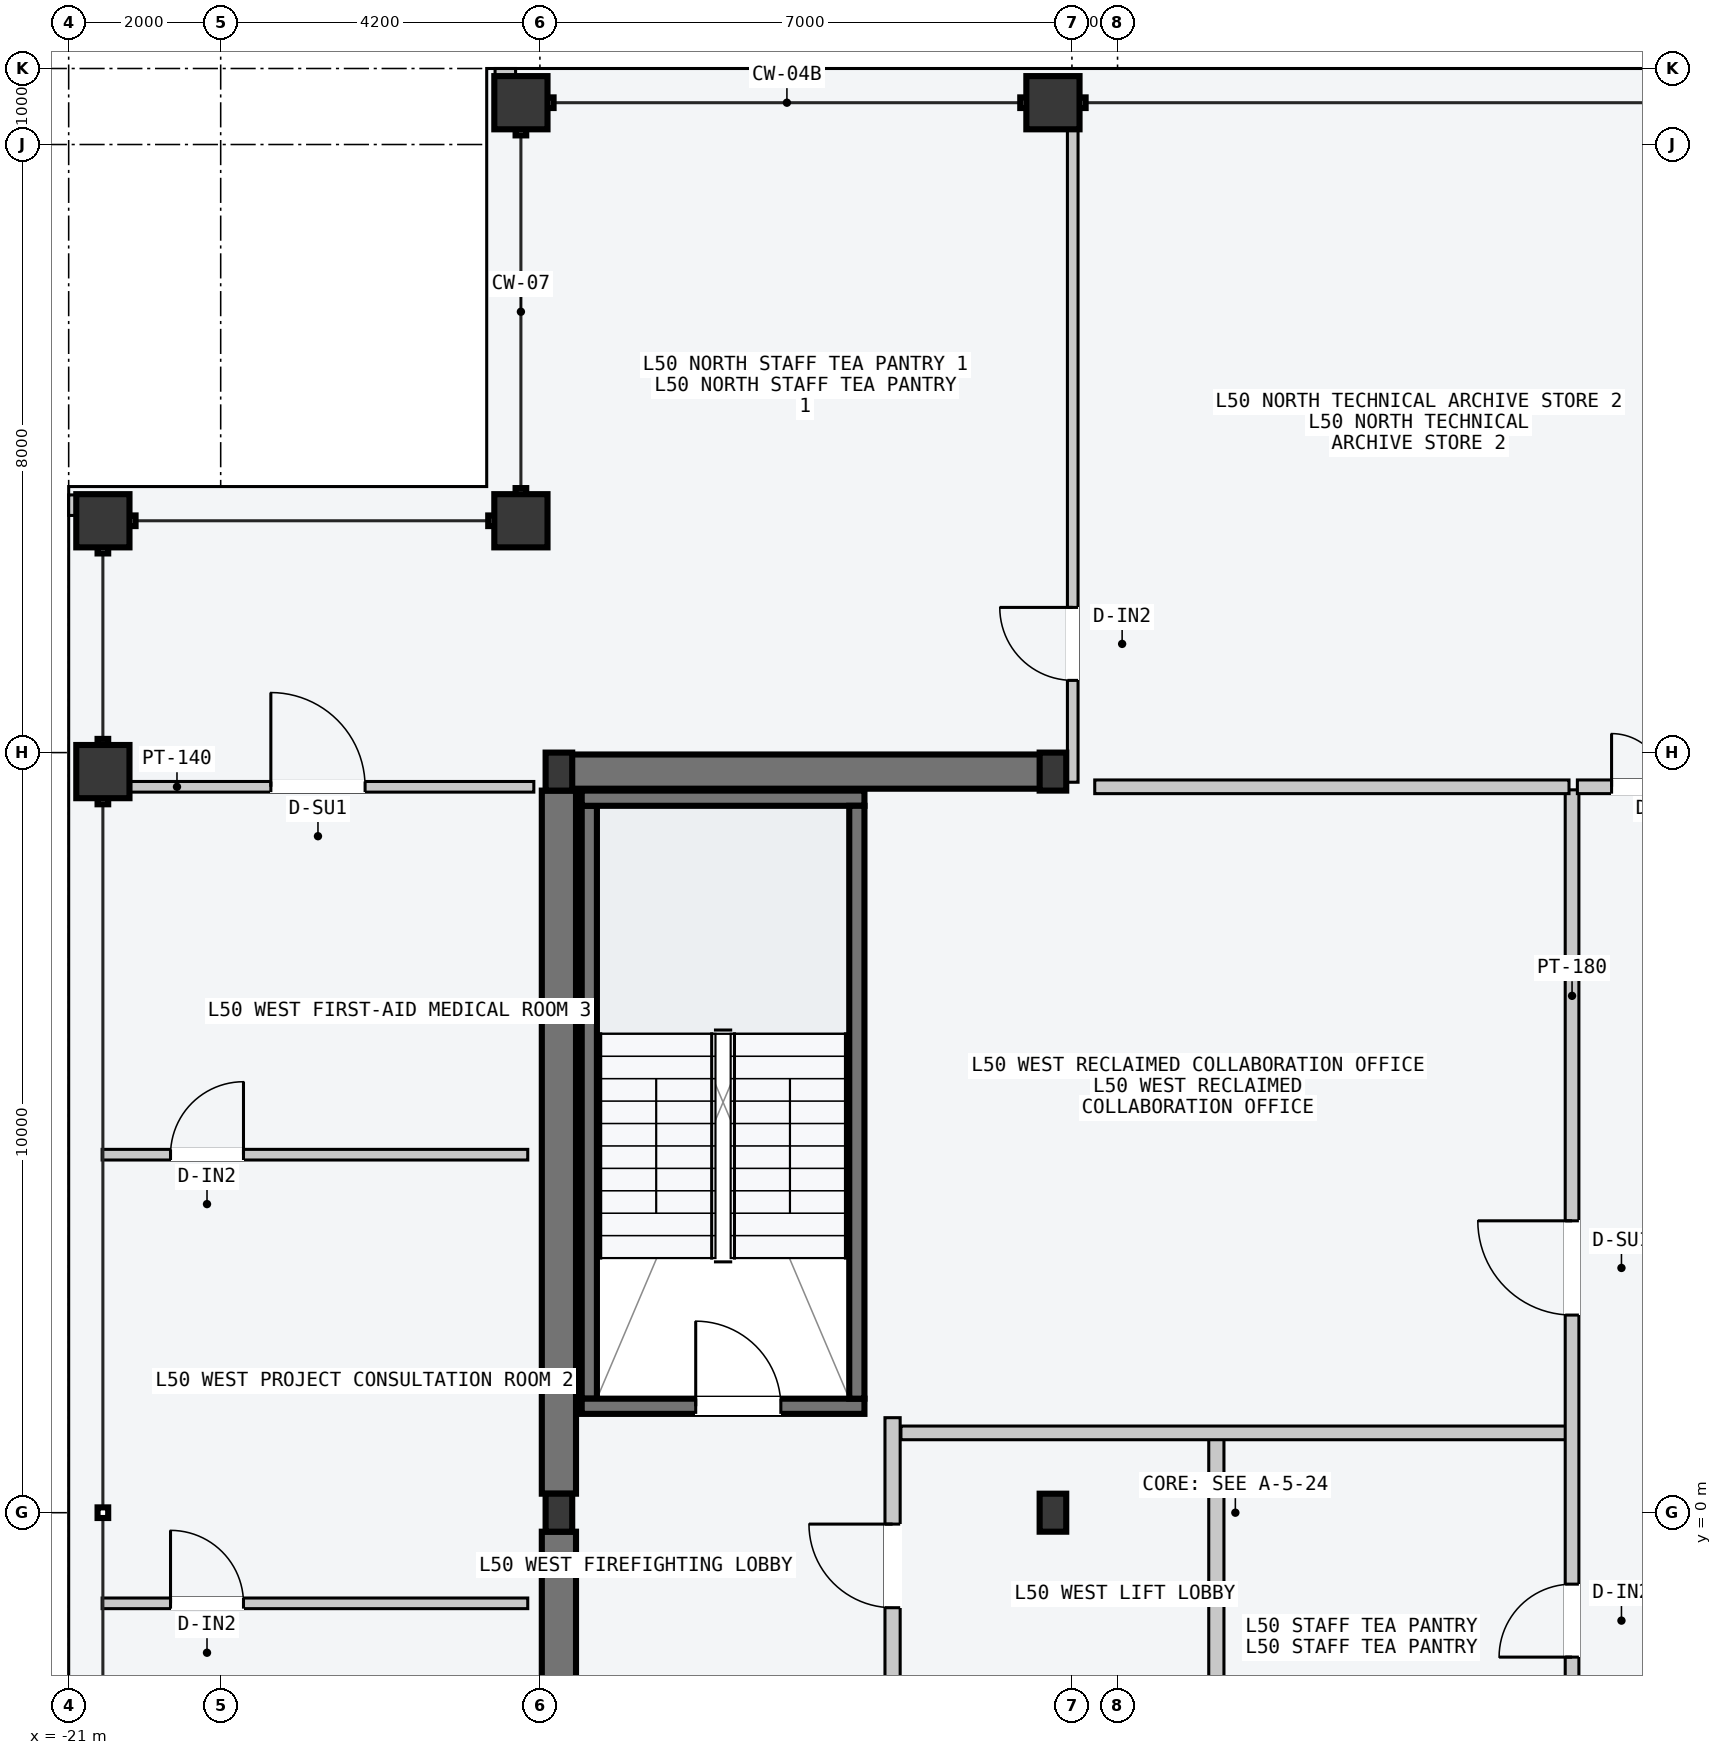
"""IFC4 building model, lengths in metres.
Left out: names, types, materials, properties, quantities, classifications, styles, units other than length and angle.
Written with IfcOpenShell. Run it as: python <this file> out.ifc"""

import sys

from ifc_helpers import new_model, si_unit, direction, frame, frame_2d, origin, origin_2d, place, context, subcontext, project, spatial, rectangle, hollow_rectangle, i_section, extrude, element, fill, save


model = new_model("IFC4")
c1 = context("Model", 3, precision=1e-05, world=origin(), true_north=direction((0.0, 1.0)))
c2 = subcontext(c1, "Body", "Model", "MODEL_VIEW")
j1 = project(units=[si_unit("LENGTHUNIT", "METRE"), si_unit("PLANEANGLEUNIT", "RADIAN")], contexts=[c1])
p1 = place(None, origin())
s1 = spatial("IfcSite", under=j1, at=p1, CompositionType="ELEMENT")
p2 = place(p1, origin())
s2 = spatial("IfcBuilding", under=s1, at=p2, CompositionType="ELEMENT")
p3 = place(p2, frame((0.0, 0.0, 191.1)))
s3 = spatial("IfcBuildingStorey", under=s2, at=p3, CompositionType="ELEMENT", Elevation=191.1)
p4 = place(p3, frame((-14.53, 9.75, -0.2), z_axis=(0.0, 0.0, 1.0), x_axis=(1.0, 0.0, 0.0)))
e1 = element("IfcWall", 1, at=p4, inside=s3, PredefinedType="SHEAR", context=c2, shape_type="SweptSolid", body=[
    extrude(rectangle(XDim=6.46, YDim=0.45, at=frame_2d((3.23, 0.0))), origin(), (0.0, 0.0, 1.0), 3.6),
])
for number, where, z_axis, x_axis in (
    (2, (-14.55, -9.5, -0.2), (0.0, 0.0, 1.0), (0.0, 1.0, 0.0)),
    (3, (-14.55, 0.25, -0.2), (0.0, 0.0, 1.0), (0.0, 1.0, 0.0)),
):
    element("IfcWall", number, at=place(p3, frame(where, z_axis=z_axis, x_axis=x_axis)), inside=s3, PredefinedType="SHEAR", context=c2, shape_type="SweptSolid", body=[
        extrude(rectangle(XDim=9.25, YDim=0.45, at=frame_2d((4.625, 0.0))), origin(), (0.0, 0.0, 1.0), 3.6),
    ])
p5 = place(p3, frame((-14.15, 1.5, -0.2), z_axis=(0.0, 0.0, 1.0), x_axis=(0.0, 1.0, 0.0)))
e4 = element("IfcWall", 4, at=p5, inside=s3, PredefinedType="SOLIDWALL", context=c2, shape_type="SweptSolid", body=[
    extrude(rectangle(XDim=7.8, YDim=0.2, at=frame_2d((3.9, 0.0))), origin(), (0.0, 0.0, 1.0), 3.6),
])
p6 = place(p3, frame((-14.25, 1.4, -0.2), z_axis=(0.0, 0.0, 1.0), x_axis=(1.0, 0.0, 0.0)))
e5 = element("IfcWall", 5, at=p6, inside=s3, PredefinedType="SOLIDWALL", context=c2, shape_type="SweptSolid", body=[
    extrude(rectangle(XDim=3.72, YDim=0.2, at=frame_2d((1.86, 0.0))), origin(), (0.0, 0.0, 1.0), 3.6),
])
p7 = place(p6, frame((1.5, 0.0, 0.2)))
e6 = element("IfcOpeningElement", 6, at=p7, cuts=e5, PredefinedType="OPENING", context=c2, shape_type="SweptSolid", body=[
    extrude(rectangle(XDim=1.12, YDim=2.18, at=frame_2d((0.56, 1.09))), frame((0.0, 0.11, 0.0), z_axis=(0.0, -1.0, 0.0), x_axis=(1.0, 0.0, 0.0)), (0.0, 0.0, 1.0), 0.22),
])
p8 = place(p3, frame((-14.25, 9.4, -0.2), z_axis=(0.0, 0.0, 1.0), x_axis=(1.0, 0.0, 0.0)))
e7 = element("IfcWall", 7, at=p8, inside=s3, PredefinedType="SOLIDWALL", context=c2, shape_type="SweptSolid", body=[
    extrude(rectangle(XDim=3.72, YDim=0.2, at=frame_2d((1.86, 0.0))), origin(), (0.0, 0.0, 1.0), 3.6),
])
p9 = place(p3, frame((-10.63, 1.5, -0.2), z_axis=(0.0, 0.0, 1.0), x_axis=(0.0, 1.0, 0.0)))
e8 = element("IfcWall", 8, at=p9, inside=s3, PredefinedType="SOLIDWALL", context=c2, shape_type="SweptSolid", body=[
    extrude(rectangle(XDim=7.8, YDim=0.2, at=frame_2d((3.9, 0.0))), origin(), (0.0, 0.0, 1.0), 3.6),
])
for number, where, z_axis, x_axis in (
    (9, (-14.55, 0.0, 0.0), (0.0, 0.0, 1.0), (1.0, 0.0, 0.0)),
    (10, (-14.55, 9.75, 0.0), (0.0, 0.0, 1.0), (1.0, 0.0, 0.0)),
    (11, (-8.05, 0.0, 0.0), (0.0, 0.0, 1.0), (1.0, 0.0, 0.0)),
    (12, (-8.05, 9.75, 0.0), (0.0, 0.0, 1.0), (1.0, 0.0, 0.0)),
):
    element("IfcColumn", number, at=place(p3, frame(where, z_axis=z_axis, x_axis=x_axis)), inside=s3, PredefinedType="COLUMN", context=c2, shape_type="SweptSolid", body=[
        extrude(i_section(OverallWidth=0.35, OverallDepth=0.5, WebThickness=0.02, FlangeThickness=0.032, at=origin_2d()), origin(), (0.0, 0.0, 1.0), 3.6),
    ])
for number, where, z_axis, x_axis in (
    (13, (-15.05, 18.55, 0.0), (0.0, 0.0, 1.0), (1.0, 0.0, 0.0)),
    (14, (-8.05, 18.55, 0.0), (0.0, 0.0, 1.0), (1.0, 0.0, 0.0)),
    (15, (-20.55, 9.75, 0.0), (0.0, 0.0, 1.0), (0.0, 1.0, 0.0)),
    (16, (-20.55, 13.05, 0.0), (0.0, 0.0, 1.0), (0.0, 1.0, 0.0)),
    (17, (-15.05, 13.05, 0.0), (0.0, 0.0, 1.0), (1.0, 0.0, 0.0)),
):
    element("IfcColumn", number, at=place(p3, frame(where, z_axis=z_axis, x_axis=x_axis)), inside=s3, PredefinedType="COLUMN", context=c2, shape_type="SweptSolid", body=[
        extrude(hollow_rectangle(XDim=0.7, YDim=0.7, WallThickness=0.03, at=origin_2d()), origin(), (0.0, 0.0, 1.0), 3.6),
    ])
for number, where, z_axis, x_axis in (
    (18, (-15.39, 18.89, 0.0), (0.0, 0.0, 1.0), (1.0, 0.0, 0.0)),
    (19, (-20.89, 13.12, 0.0), (0.0, 0.0, 1.0), (0.0, 1.0, 0.0)),
):
    element("IfcWall", number, at=place(p3, frame(where, z_axis=z_axis, x_axis=x_axis)), inside=s3, PredefinedType="PARAPET", context=c2, shape_type="SweptSolid", body=[
        extrude(rectangle(XDim=0.27, YDim=0.22, at=frame_2d((0.135, 0.0))), origin(), (0.0, 0.0, 1.0), 1.2),
    ])
p10 = place(p3, frame((-5.9, -9.45, 0.0), z_axis=(0.0, 0.0, 1.0), x_axis=(0.0, 1.0, 0.0)))
e20 = element("IfcWall", 20, at=p10, inside=s3, PredefinedType="PARTITIONING", context=c2, shape_type="SweptSolid", body=[
    extrude(rectangle(XDim=10.5, YDim=0.2, at=frame_2d((5.25, 0.0))), origin(), (0.0, 0.0, 1.0), 3.4),
])
p11 = place(p10, frame((3.9, 0.0, 0.0)))
e21 = element("IfcOpeningElement", 21, at=p11, cuts=e20, PredefinedType="OPENING", context=c2, shape_type="SweptSolid", body=[
    extrude(rectangle(XDim=1.5, YDim=2.2, at=frame_2d((0.75, 1.1))), frame((0.0, 0.11, 0.0), z_axis=(0.0, -1.0, 0.0), x_axis=(1.0, 0.0, 0.0)), (0.0, 0.0, 1.0), 0.22),
])
p12 = place(p3, frame((-10.16, -2.55, 0.0), z_axis=(0.0, 0.0, 1.0), x_axis=(0.0, 1.0, 0.0)))
e22 = element("IfcWall", 22, at=p12, inside=s3, PredefinedType="PARTITIONING", context=c2, shape_type="SweptSolid", body=[
    extrude(rectangle(XDim=3.8, YDim=0.2, at=frame_2d((1.9, 0.0))), origin(), (0.0, 0.0, 1.0), 3.4),
])
p13 = place(p12, frame((1.3, 0.0, 0.0)))
e23 = element("IfcOpeningElement", 23, at=p13, cuts=e22, PredefinedType="OPENING", context=c2, shape_type="SweptSolid", body=[
    extrude(rectangle(XDim=1.1, YDim=2.15, at=frame_2d((0.55, 1.075))), frame((0.0, 0.11, 0.0), z_axis=(0.0, -1.0, 0.0), x_axis=(1.0, 0.0, 0.0)), (0.0, 0.0, 1.0), 0.22),
])
p14 = place(p3, frame((-10.05, 1.05, 0.0), z_axis=(0.0, 0.0, 1.0), x_axis=(1.0, 0.0, 0.0)))
e24 = element("IfcWall", 24, at=p14, inside=s3, PredefinedType="PARTITIONING", context=c2, shape_type="SweptSolid", body=[
    extrude(rectangle(XDim=8.79, YDim=0.18, at=frame_2d((4.395, 0.0))), origin(), (0.0, 0.0, 1.0), 3.4),
])
p15 = place(p3, frame((-1.22, -3.5, 0.0), z_axis=(0.0, 0.0, 1.0), x_axis=(0.0, 1.0, 0.0)))
e25 = element("IfcWall", 25, at=p15, inside=s3, PredefinedType="PARTITIONING", context=c2, shape_type="SweptSolid", body=[
    extrude(rectangle(XDim=13.01, YDim=0.18, at=frame_2d((6.505, 0.0))), origin(), (0.0, 0.0, 1.0), 3.4),
])
p16 = place(p15, frame((6.1, 0.0, 0.0)))
e26 = element("IfcOpeningElement", 26, at=p16, cuts=e25, PredefinedType="OPENING", context=c2, shape_type="SweptSolid", body=[
    extrude(rectangle(XDim=1.24, YDim=2.24, at=frame_2d((0.62, 1.12))), frame((0.0, 0.1, 0.0), z_axis=(0.0, -1.0, 0.0), x_axis=(1.0, 0.0, 0.0)), (0.0, 0.0, 1.0), 0.2),
])
p17 = place(p15, frame((1.6, 0.0, 0.0)))
e27 = element("IfcOpeningElement", 27, at=p17, cuts=e25, PredefinedType="OPENING", context=c2, shape_type="SweptSolid", body=[
    extrude(rectangle(XDim=0.96, YDim=2.18, at=frame_2d((0.48, 1.09))), frame((0.0, 0.1, 0.0), z_axis=(0.0, -1.0, 0.0), x_axis=(1.0, 0.0, 0.0)), (0.0, 0.0, 1.0), 0.2),
])
p18 = place(p3, frame((-7.5, 9.55, 0.0), z_axis=(0.0, 0.0, 1.0), x_axis=(1.0, 0.0, 0.0)))
e28 = element("IfcWall", 28, at=p18, inside=s3, PredefinedType="PARTITIONING", context=c2, shape_type="SweptSolid", body=[
    extrude(rectangle(XDim=6.24, YDim=0.18, at=frame_2d((3.12, 0.0))), origin(), (0.0, 0.0, 1.0), 3.4),
])
p19 = place(p3, frame((-7.79, 9.61, 0.0), z_axis=(0.0, 0.0, 1.0), x_axis=(0.0, 1.0, 0.0)))
e29 = element("IfcWall", 29, at=p19, inside=s3, PredefinedType="PARTITIONING", context=c2, shape_type="SweptSolid", body=[
    extrude(rectangle(XDim=8.95, YDim=0.14, at=frame_2d((4.475, 0.0))), origin(), (0.0, 0.0, 1.0), 3.4),
])
p20 = place(p19, frame((1.34, 0.0, 0.0)))
e30 = element("IfcOpeningElement", 30, at=p20, cuts=e29, PredefinedType="OPENING", context=c2, shape_type="SweptSolid", body=[
    extrude(rectangle(XDim=0.96, YDim=2.18, at=frame_2d((0.48, 1.09))), frame((0.0, 0.08, 0.0), z_axis=(0.0, -1.0, 0.0), x_axis=(1.0, 0.0, 0.0)), (0.0, 0.0, 1.0), 0.16),
])
p21 = place(p3, frame((-1.15, 9.55, 0.0), z_axis=(0.0, 0.0, 1.0), x_axis=(1.0, 0.0, 0.0)))
e31 = element("IfcWall", 31, at=p21, inside=s3, PredefinedType="PARTITIONING", context=c2, shape_type="SweptSolid", body=[
    extrude(rectangle(XDim=2.3, YDim=0.18, at=frame_2d((1.15, 0.0))), origin(), (0.0, 0.0, 1.0), 3.4),
])
p22 = place(p21, frame((0.45, 0.0, 0.0)))
e32 = element("IfcOpeningElement", 32, at=p22, cuts=e31, PredefinedType="OPENING", context=c2, shape_type="SweptSolid", body=[
    extrude(rectangle(XDim=1.4, YDim=2.2, at=frame_2d((0.7, 1.1))), frame((0.0, 0.1, 0.0), z_axis=(0.0, -1.0, 0.0), x_axis=(1.0, 0.0, 0.0)), (0.0, 0.0, 1.0), 0.2),
])
p23 = place(p3, frame((-20.56, 9.55, 0.0), z_axis=(0.0, 0.0, 1.0), x_axis=(1.0, 0.0, 0.0)))
e33 = element("IfcWall", 33, at=p23, inside=s3, PredefinedType="PARTITIONING", context=c2, shape_type="SweptSolid", body=[
    extrude(rectangle(XDim=5.68, YDim=0.14, at=frame_2d((2.84, 0.0))), origin(), (0.0, 0.0, 1.0), 3.4),
])
p24 = place(p23, frame((2.22, 0.0, 0.0)))
e34 = element("IfcOpeningElement", 34, at=p24, cuts=e33, PredefinedType="OPENING", context=c2, shape_type="SweptSolid", body=[
    extrude(rectangle(XDim=1.24, YDim=2.24, at=frame_2d((0.62, 1.12))), frame((0.0, 0.08, 0.0), z_axis=(0.0, -1.0, 0.0), x_axis=(1.0, 0.0, 0.0)), (0.0, 0.0, 1.0), 0.16),
])
p25 = place(p3, frame((-20.56, -1.192, 0.0), z_axis=(0.0, 0.0, 1.0), x_axis=(1.0, 0.0, 0.0)))
e35 = element("IfcWall", 35, at=p25, inside=s3, PredefinedType="PARTITIONING", context=c2, shape_type="SweptSolid", body=[
    extrude(rectangle(XDim=5.6, YDim=0.14, at=frame_2d((2.8, 0.0))), origin(), (0.0, 0.0, 1.0), 3.4),
])
p26 = place(p25, frame((0.9, 0.0, 0.0)))
e36 = element("IfcOpeningElement", 36, at=p26, cuts=e35, PredefinedType="OPENING", context=c2, shape_type="SweptSolid", body=[
    extrude(rectangle(XDim=0.96, YDim=2.18, at=frame_2d((0.48, 1.09))), frame((0.0, 0.08, 0.0), z_axis=(0.0, -1.0, 0.0), x_axis=(1.0, 0.0, 0.0)), (0.0, 0.0, 1.0), 0.16),
])
p27 = place(p3, frame((-20.56, 4.71, 0.0), z_axis=(0.0, 0.0, 1.0), x_axis=(1.0, 0.0, 0.0)))
e37 = element("IfcWall", 37, at=p27, inside=s3, PredefinedType="PARTITIONING", context=c2, shape_type="SweptSolid", body=[
    extrude(rectangle(XDim=5.6, YDim=0.14, at=frame_2d((2.8, 0.0))), origin(), (0.0, 0.0, 1.0), 3.4),
])
p28 = place(p27, frame((0.9, 0.0, 0.0)))
e38 = element("IfcOpeningElement", 38, at=p28, cuts=e37, PredefinedType="OPENING", context=c2, shape_type="SweptSolid", body=[
    extrude(rectangle(XDim=0.96, YDim=2.18, at=frame_2d((0.48, 1.09))), frame((0.0, 0.08, 0.0), z_axis=(0.0, -1.0, 0.0), x_axis=(1.0, 0.0, 0.0)), (0.0, 0.0, 1.0), 0.16),
])
p29 = place(p7, origin())
e39 = element("IfcDoor", 39, at=p29, inside=s3, OperationType="SINGLE_SWING_LEFT", PredefinedType="DOOR", context=c2, shape_type="SweptSolid", body=[
    extrude(rectangle(XDim=1.12, YDim=2.18, at=frame_2d((0.56, 1.09))), frame((0.0, 0.025, 0.0), z_axis=(0.0, -1.0, 0.0), x_axis=(1.0, 0.0, 0.0)), (0.0, 0.0, 1.0), 0.05),
])
fill(e6, e39)
p30 = place(p13, origin())
e40 = element("IfcDoor", 40, at=p30, inside=s3, OperationType="SINGLE_SWING_RIGHT", PredefinedType="DOOR", context=c2, shape_type="SweptSolid", body=[
    extrude(rectangle(XDim=1.1, YDim=2.15, at=frame_2d((0.55, 1.075))), frame((0.0, 0.025, 0.0), z_axis=(0.0, -1.0, 0.0), x_axis=(1.0, 0.0, 0.0)), (0.0, 0.0, 1.0), 0.05),
])
fill(e23, e40)
p31 = place(p16, origin())
e41 = element("IfcDoor", 41, at=p31, inside=s3, OperationType="SINGLE_SWING_RIGHT", PredefinedType="DOOR", context=c2, shape_type="SweptSolid", body=[
    extrude(rectangle(XDim=1.24, YDim=2.24, at=frame_2d((0.62, 1.12))), frame((0.0, 0.025, 0.0), z_axis=(0.0, -1.0, 0.0), x_axis=(1.0, 0.0, 0.0)), (0.0, 0.0, 1.0), 0.05),
])
fill(e26, e41)
p32 = place(p17, origin())
e42 = element("IfcDoor", 42, at=p32, inside=s3, OperationType="SINGLE_SWING_LEFT", PredefinedType="DOOR", context=c2, shape_type="SweptSolid", body=[
    extrude(rectangle(XDim=0.96, YDim=2.18, at=frame_2d((0.48, 1.09))), frame((0.0, 0.025, 0.0), z_axis=(0.0, -1.0, 0.0), x_axis=(1.0, 0.0, 0.0)), (0.0, 0.0, 1.0), 0.05),
])
fill(e27, e42)
p33 = place(p20, origin())
e43 = element("IfcDoor", 43, at=p33, inside=s3, OperationType="SINGLE_SWING_RIGHT", PredefinedType="DOOR", context=c2, shape_type="SweptSolid", body=[
    extrude(rectangle(XDim=0.96, YDim=2.18, at=frame_2d((0.48, 1.09))), frame((0.0, 0.025, 0.0), z_axis=(0.0, -1.0, 0.0), x_axis=(1.0, 0.0, 0.0)), (0.0, 0.0, 1.0), 0.05),
])
fill(e30, e43)
p34 = place(p22, origin())
e44 = element("IfcDoor", 44, at=p34, inside=s3, OperationType="DOUBLE_DOOR_SINGLE_SWING", PredefinedType="DOOR", context=c2, shape_type="SweptSolid", body=[
    extrude(rectangle(XDim=1.4, YDim=2.2, at=frame_2d((0.7, 1.1))), frame((0.0, 0.025, 0.0), z_axis=(0.0, -1.0, 0.0), x_axis=(1.0, 0.0, 0.0)), (0.0, 0.0, 1.0), 0.05),
])
fill(e32, e44)
p35 = place(p24, origin())
e45 = element("IfcDoor", 45, at=p35, inside=s3, OperationType="SINGLE_SWING_LEFT", PredefinedType="DOOR", context=c2, shape_type="SweptSolid", body=[
    extrude(rectangle(XDim=1.24, YDim=2.24, at=frame_2d((0.62, 1.12))), frame((0.0, 0.025, 0.0), z_axis=(0.0, -1.0, 0.0), x_axis=(1.0, 0.0, 0.0)), (0.0, 0.0, 1.0), 0.05),
])
fill(e34, e45)
p36 = place(p26, origin())
e46 = element("IfcDoor", 46, at=p36, inside=s3, OperationType="SINGLE_SWING_LEFT", PredefinedType="DOOR", context=c2, shape_type="SweptSolid", body=[
    extrude(rectangle(XDim=0.96, YDim=2.18, at=frame_2d((0.48, 1.09))), frame((0.0, 0.025, 0.0), z_axis=(0.0, -1.0, 0.0), x_axis=(1.0, 0.0, 0.0)), (0.0, 0.0, 1.0), 0.05),
])
fill(e36, e46)
p37 = place(p28, origin())
e47 = element("IfcDoor", 47, at=p37, inside=s3, OperationType="SINGLE_SWING_RIGHT", PredefinedType="DOOR", context=c2, shape_type="SweptSolid", body=[
    extrude(rectangle(XDim=0.96, YDim=2.18, at=frame_2d((0.48, 1.09))), frame((0.0, 0.025, 0.0), z_axis=(0.0, -1.0, 0.0), x_axis=(1.0, 0.0, 0.0)), (0.0, 0.0, 1.0), 0.05),
])
fill(e38, e47)
save(model, sys.argv[1])
